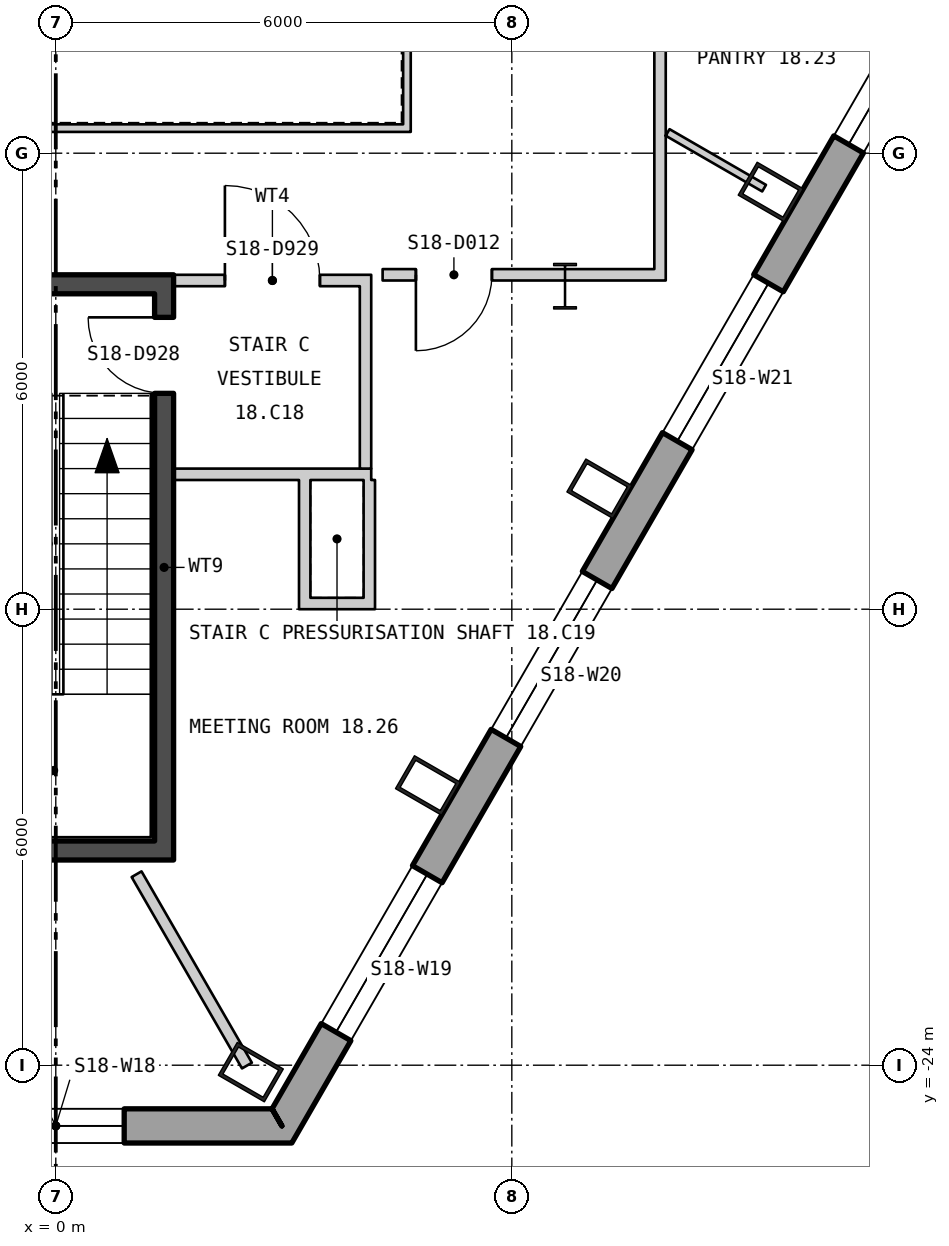
"""IFC4 building model, lengths in metres.
Left out: names, types, materials, properties, quantities, classifications, styles, units other than length and angle.
Written with IfcOpenShell. Run it as: python <this file> out.ifc"""

import sys

from ifc_helpers import new_model, si_unit, direction, frame, frame_2d, origin, origin_2d, place, context, subcontext, project, spatial, polyline, rectangle, hollow_rectangle, i_section, outline, extrude, element, fill, save


model = new_model("IFC4")
c1 = context("Model", 3, precision=1e-05, world=origin(), true_north=direction((0.0, 1.0)))
c2 = subcontext(c1, "Body", "Model", "MODEL_VIEW")
j1 = project(units=[si_unit("LENGTHUNIT", "METRE"), si_unit("PLANEANGLEUNIT", "RADIAN")], contexts=[c1])
p1 = place(None, origin())
s1 = spatial("IfcSite", under=j1, at=p1, CompositionType="ELEMENT")
p2 = place(p1, origin())
s2 = spatial("IfcBuilding", under=s1, at=p2, CompositionType="ELEMENT")
p3 = place(p2, frame((0.0, 0.0, 245.4)))
s3 = spatial("IfcBuildingStorey", under=s2, at=p3, CompositionType="ELEMENT", Elevation=245.4)
for number, where, z_axis, x_axis in (
    (1, (2.566, -24.091, 0.0), (0.0, 0.0, 1.0), (0.5, 0.866, 0.0)),
    (2, (4.897, -20.319, 0.0), (0.0, 0.0, 1.0), (0.5, 0.866, 0.0)),
    (3, (7.152, -16.415, 0.0), (0.0, 0.0, 1.0), (0.5, 0.866, 0.0)),
    (4, (9.406, -12.51, 0.0), (0.0, 0.0, 1.0), (0.5, 0.866, 0.0)),
):
    element("IfcColumn", number, at=place(p3, frame(where, z_axis=z_axis, x_axis=x_axis)), inside=s3, PredefinedType="COLUMN", context=c2, shape_type="SweptSolid", body=[
        extrude(hollow_rectangle(XDim=0.5, YDim=0.7, WallThickness=0.045, at=origin_2d()), origin(), (0.0, 0.0, 1.0), 3.9),
    ])
p4 = place(p3, frame((6.7, -13.75, 0.0), z_axis=(0.0, 0.0, 1.0), x_axis=(1.0, 0.0, 0.0)))
e5 = element("IfcColumn", 5, at=p4, inside=s3, PredefinedType="COLUMN", context=c2, shape_type="SweptSolid", body=[
    extrude(i_section(OverallWidth=0.3, OverallDepth=0.6, WebThickness=0.015, FlangeThickness=0.03, at=origin_2d()), origin(), (0.0, 0.0, 1.0), 3.9),
])
p5 = place(p3, frame((-2.975, -24.799, -0.18), z_axis=(0.0, 0.0, 1.0), x_axis=(1.0, 0.0, 0.0)))
e6 = element("IfcWall", 6, at=p5, inside=s3, PredefinedType="SOLIDWALL", context=c2, shape_type="SweptSolid", body=[
    extrude(outline(polyline([(-0.13, -0.225), (6.08, -0.225), (5.82, 0.225), (0.13, 0.225), (-0.13, -0.225)])), origin(), (0.0, 0.0, 1.0), 3.68),
])
p6 = place(p5, frame((2.075, 0.0, 1.08)))
e7 = element("IfcOpeningElement", 7, at=p6, cuts=e6, PredefinedType="OPENING", context=c2, shape_type="SweptSolid", body=[
    extrude(rectangle(XDim=1.8, YDim=2.0, at=frame_2d((0.9, 1.0))), frame((0.0, 0.235, 0.0), z_axis=(0.0, -1.0, 0.0), x_axis=(1.0, 0.0, 0.0)), (0.0, 0.0, 1.0), 0.47),
])
p7 = place(p3, frame((2.975, -24.799, -0.18), z_axis=(0.0, 0.0, 1.0), x_axis=(0.500000335318, 0.866025210188, 0.0)))
e8 = element("IfcWall", 8, at=p7, inside=s3, PredefinedType="SOLIDWALL", context=c2, shape_type="SweptSolid", body=[
    extrude(outline(polyline([(-0.13, -0.225), (45.88, -0.225), (45.62, 0.225), (0.13, 0.225), (-0.13, -0.225)])), origin(), (0.0, 0.0, 1.0), 3.68),
])
p8 = place(p7, frame((1.425, 0.0, 1.08)))
e9 = element("IfcOpeningElement", 9, at=p8, cuts=e8, PredefinedType="OPENING", context=c2, shape_type="SweptSolid", body=[
    extrude(rectangle(XDim=2.4, YDim=2.0, at=frame_2d((1.2, 1.0))), frame((0.0, 0.235, 0.0), z_axis=(0.0, -1.0, 0.0), x_axis=(1.0, 0.0, 0.0)), (0.0, 0.0, 1.0), 0.47),
])
p9 = place(p7, frame((5.895, 0.0, 1.08)))
e10 = element("IfcOpeningElement", 10, at=p9, cuts=e8, PredefinedType="OPENING", context=c2, shape_type="SweptSolid", body=[
    extrude(rectangle(XDim=2.4, YDim=2.0, at=frame_2d((1.2, 1.0))), frame((0.0, 0.235, 0.0), z_axis=(0.0, -1.0, 0.0), x_axis=(1.0, 0.0, 0.0)), (0.0, 0.0, 1.0), 0.47),
])
p10 = place(p7, frame((10.403, 0.0, 1.08)))
e11 = element("IfcOpeningElement", 11, at=p10, cuts=e8, PredefinedType="OPENING", context=c2, shape_type="SweptSolid", body=[
    extrude(rectangle(XDim=2.4, YDim=2.0, at=frame_2d((1.2, 1.0))), frame((0.0, 0.235, 0.0), z_axis=(0.0, -1.0, 0.0), x_axis=(1.0, 0.0, 0.0)), (0.0, 0.0, 1.0), 0.47),
])
p11 = place(p7, frame((14.912, 0.0, 1.08)))
e12 = element("IfcOpeningElement", 12, at=p11, cuts=e8, PredefinedType="OPENING", context=c2, shape_type="SweptSolid", body=[
    extrude(rectangle(XDim=2.4, YDim=2.0, at=frame_2d((1.2, 1.0))), frame((0.0, 0.235, 0.0), z_axis=(0.0, -1.0, 0.0), x_axis=(1.0, 0.0, 0.0)), (0.0, 0.0, 1.0), 0.47),
])
p12 = place(p7, frame((19.421, 0.0, 1.08)))
e13 = element("IfcOpeningElement", 13, at=p12, cuts=e8, PredefinedType="OPENING", context=c2, shape_type="SweptSolid", body=[
    extrude(rectangle(XDim=2.4, YDim=2.0, at=frame_2d((1.2, 1.0))), frame((0.0, 0.235, 0.0), z_axis=(0.0, -1.0, 0.0), x_axis=(1.0, 0.0, 0.0)), (0.0, 0.0, 1.0), 0.47),
])
p13 = place(p7, frame((23.929, 0.0, 1.08)))
e14 = element("IfcOpeningElement", 14, at=p13, cuts=e8, PredefinedType="OPENING", context=c2, shape_type="SweptSolid", body=[
    extrude(rectangle(XDim=2.4, YDim=2.0, at=frame_2d((1.2, 1.0))), frame((0.0, 0.235, 0.0), z_axis=(0.0, -1.0, 0.0), x_axis=(1.0, 0.0, 0.0)), (0.0, 0.0, 1.0), 0.47),
])
p14 = place(p7, frame((28.438, 0.0, 1.08)))
e15 = element("IfcOpeningElement", 15, at=p14, cuts=e8, PredefinedType="OPENING", context=c2, shape_type="SweptSolid", body=[
    extrude(rectangle(XDim=2.4, YDim=2.0, at=frame_2d((1.2, 1.0))), frame((0.0, 0.235, 0.0), z_axis=(0.0, -1.0, 0.0), x_axis=(1.0, 0.0, 0.0)), (0.0, 0.0, 1.0), 0.47),
])
p15 = place(p7, frame((32.947, 0.0, 1.08)))
e16 = element("IfcOpeningElement", 16, at=p15, cuts=e8, PredefinedType="OPENING", context=c2, shape_type="SweptSolid", body=[
    extrude(rectangle(XDim=2.4, YDim=2.0, at=frame_2d((1.2, 1.0))), frame((0.0, 0.235, 0.0), z_axis=(0.0, -1.0, 0.0), x_axis=(1.0, 0.0, 0.0)), (0.0, 0.0, 1.0), 0.47),
])
p16 = place(p7, frame((37.455, 0.0, 1.08)))
e17 = element("IfcOpeningElement", 17, at=p16, cuts=e8, PredefinedType="OPENING", context=c2, shape_type="SweptSolid", body=[
    extrude(rectangle(XDim=2.4, YDim=2.0, at=frame_2d((1.2, 1.0))), frame((0.0, 0.235, 0.0), z_axis=(0.0, -1.0, 0.0), x_axis=(1.0, 0.0, 0.0)), (0.0, 0.0, 1.0), 0.47),
])
p17 = place(p7, frame((41.925, 0.0, 1.08)))
e18 = element("IfcOpeningElement", 18, at=p17, cuts=e8, PredefinedType="OPENING", context=c2, shape_type="SweptSolid", body=[
    extrude(rectangle(XDim=2.4, YDim=2.0, at=frame_2d((1.2, 1.0))), frame((0.0, 0.235, 0.0), z_axis=(0.0, -1.0, 0.0), x_axis=(1.0, 0.0, 0.0)), (0.0, 0.0, 1.0), 0.47),
])
p18 = place(p3, frame((-4.67, -11.67, 0.0), z_axis=(0.0, 0.0, 1.0), x_axis=(1.0, 0.0, 0.0)))
e19 = element("IfcWall", 19, at=p18, inside=s3, PredefinedType="PARTITIONING", context=c2, shape_type="SweptSolid", body=[
    extrude(rectangle(XDim=9.34, YDim=0.1, at=frame_2d((4.67, 0.0))), origin(), (0.0, 0.0, 1.0), 3.7),
])
p19 = place(p3, frame((4.62, -11.62, 0.0), z_axis=(0.0, 0.0, 1.0), x_axis=(0.0, 1.0, 0.0)))
e20 = element("IfcWall", 20, at=p19, inside=s3, PredefinedType="PARTITIONING", context=c2, shape_type="SweptSolid", body=[
    extrude(rectangle(XDim=8.04, YDim=0.1, at=frame_2d((4.02, 0.0))), origin(), (0.0, 0.0, 1.0), 3.7),
])
p20 = place(p3, frame((1.425, -21.05, 0.0), z_axis=(0.0, 0.0, 1.0), x_axis=(0.0, 1.0, 0.0)))
e21 = element("IfcWall", 21, at=p20, inside=s3, PredefinedType="SHEAR", context=c2, shape_type="SweptSolid", body=[
    extrude(rectangle(XDim=7.2, YDim=0.25, at=frame_2d((3.6, 0.0))), origin(), (0.0, 0.0, 1.0), 3.7),
])
p21 = place(p20, frame((5.89, 0.0, 0.0)))
e22 = element("IfcOpeningElement", 22, at=p21, cuts=e21, PredefinedType="OPENING", context=c2, shape_type="SweptSolid", body=[
    extrude(rectangle(XDim=1.0, YDim=2.1, at=frame_2d((0.5, 1.05))), frame((0.0, 0.135, 0.0), z_axis=(0.0, -1.0, 0.0), x_axis=(1.0, 0.0, 0.0)), (0.0, 0.0, 1.0), 0.27),
])
for number, where, z_axis, x_axis in (
    (23, (-1.55, -21.175, 0.0), (0.0, 0.0, 1.0), (1.0, 0.0, 0.0)),
    (24, (-1.55, -13.725, 0.0), (0.0, 0.0, 1.0), (1.0, 0.0, 0.0)),
):
    element("IfcWall", number, at=place(p3, frame(where, z_axis=z_axis, x_axis=x_axis)), inside=s3, PredefinedType="SHEAR", context=c2, shape_type="SweptSolid", body=[
        extrude(rectangle(XDim=3.1, YDim=0.25, at=frame_2d((1.55, 0.0))), origin(), (0.0, 0.0, 1.0), 3.7),
    ])
p22 = place(p3, frame((1.55, -16.225, 0.0), z_axis=(0.0, 0.0, 1.0), x_axis=(1.0, 0.0, 0.0)))
e25 = element("IfcWall", 25, at=p22, inside=s3, PredefinedType="PARTITIONING", context=c2, shape_type="SweptSolid", body=[
    extrude(rectangle(XDim=2.6, YDim=0.15, at=frame_2d((1.3, 0.0))), origin(), (0.0, 0.0, 1.0), 3.7),
])
p23 = place(p3, frame((4.075, -16.15, 0.0), z_axis=(0.0, 0.0, 1.0), x_axis=(0.0, 1.0, 0.0)))
e26 = element("IfcWall", 26, at=p23, inside=s3, PredefinedType="PARTITIONING", context=c2, shape_type="SweptSolid", body=[
    extrude(rectangle(XDim=2.4, YDim=0.15, at=frame_2d((1.2, 0.0))), origin(), (0.0, 0.0, 1.0), 3.7),
])
p24 = place(p3, frame((1.55, -13.675, 0.0), z_axis=(0.0, 0.0, 1.0), x_axis=(1.0, 0.0, 0.0)))
e27 = element("IfcWall", 27, at=p24, inside=s3, PredefinedType="PARTITIONING", context=c2, shape_type="SweptSolid", body=[
    extrude(rectangle(XDim=2.6, YDim=0.15, at=frame_2d((1.3, 0.0))), origin(), (0.0, 0.0, 1.0), 2.91),
])
p25 = place(p24, frame((0.675, 0.0, 0.0)))
e28 = element("IfcOpeningElement", 28, at=p25, cuts=e27, PredefinedType="OPENING", context=c2, shape_type="SweptSolid", body=[
    extrude(rectangle(XDim=1.25, YDim=2.1, at=frame_2d((0.625, 1.05))), frame((0.0, 0.085, 0.0), z_axis=(0.0, -1.0, 0.0), x_axis=(1.0, 0.0, 0.0)), (0.0, 0.0, 1.0), 0.17),
])
p26 = place(p3, frame((3.275, -18.0, 0.0), z_axis=(0.0, 0.0, 1.0), x_axis=(0.0, 1.0, 0.0)))
e29 = element("IfcWall", 29, at=p26, inside=s3, PredefinedType="PARTITIONING", context=c2, shape_type="SweptSolid", body=[
    extrude(rectangle(XDim=1.7, YDim=0.15, at=frame_2d((0.85, 0.0))), origin(), (0.0, 0.0, 1.0), 3.01),
])
p27 = place(p3, frame((3.35, -17.925, 0.0), z_axis=(0.0, 0.0, 1.0), x_axis=(1.0, 0.0, 0.0)))
e30 = element("IfcWall", 30, at=p27, inside=s3, PredefinedType="PARTITIONING", context=c2, shape_type="SweptSolid", body=[
    extrude(rectangle(XDim=0.7, YDim=0.15, at=frame_2d((0.35, 0.0))), origin(), (0.0, 0.0, 1.0), 3.7),
])
p28 = place(p3, frame((4.125, -18.0, 0.0), z_axis=(0.0, 0.0, 1.0), x_axis=(0.0, 1.0, 0.0)))
e31 = element("IfcWall", 31, at=p28, inside=s3, PredefinedType="PARTITIONING", context=c2, shape_type="SweptSolid", body=[
    extrude(rectangle(XDim=1.7, YDim=0.15, at=frame_2d((0.85, 0.0))), origin(), (0.0, 0.0, 1.0), 3.7),
])
p29 = place(p3, frame((1.063, -21.487, 0.0), z_axis=(0.0, 0.0, 1.0), x_axis=(0.499543741449, -0.866288664579, 0.0)))
e32 = element("IfcWall", 32, at=p29, inside=s3, PredefinedType="PARTITIONING", context=c2, shape_type="SweptSolid", body=[
    extrude(rectangle(XDim=2.907, YDim=0.15, at=frame_2d((1.453, 0.0))), origin(), (0.0, 0.0, 1.0), 3.7),
])
p30 = place(p3, frame((4.3, -13.6, 0.0), z_axis=(0.0, 0.0, 1.0), x_axis=(1.0, 0.0, 0.0)))
e33 = element("IfcWall", 33, at=p30, inside=s3, PredefinedType="PARTITIONING", context=c2, shape_type="SweptSolid", body=[
    extrude(rectangle(XDim=2.4, YDim=0.15, at=frame_2d((1.2, 0.0))), origin(), (0.0, 0.0, 1.0), 2.91),
])
p31 = place(p30, frame((0.438, 0.0, 0.0)))
e34 = element("IfcOpeningElement", 34, at=p31, cuts=e33, PredefinedType="OPENING", context=c2, shape_type="SweptSolid", body=[
    extrude(rectangle(XDim=1.0, YDim=2.1, at=frame_2d((0.5, 1.05))), frame((0.0, 0.085, 0.0), z_axis=(0.0, -1.0, 0.0), x_axis=(1.0, 0.0, 0.0)), (0.0, 0.0, 1.0), 0.17),
])
p32 = place(p3, frame((6.7, -13.6, 0.0), z_axis=(0.0, 0.0, 1.0), x_axis=(1.0, 0.0, 0.0)))
e35 = element("IfcWall", 35, at=p32, inside=s3, PredefinedType="PARTITIONING", context=c2, shape_type="SweptSolid", body=[
    extrude(rectangle(XDim=1.175, YDim=0.15, at=frame_2d((0.588, 0.0))), origin(), (0.0, 0.0, 1.0), 3.16),
])
p33 = place(p3, frame((7.95, -13.675, 0.0), z_axis=(0.0, 0.0, 1.0), x_axis=(0.0, 1.0, 0.0)))
e36 = element("IfcWall", 36, at=p33, inside=s3, PredefinedType="PARTITIONING", context=c2, shape_type="SweptSolid", body=[
    extrude(rectangle(XDim=17.675, YDim=0.15, at=frame_2d((8.838, 0.0))), origin(), (0.0, 0.0, 1.0), 3.7),
])
p34 = place(p33, frame((4.109, 0.0, 0.0)))
e37 = element("IfcOpeningElement", 37, at=p34, cuts=e36, PredefinedType="OPENING", context=c2, shape_type="SweptSolid", body=[
    extrude(rectangle(XDim=1.0, YDim=2.1, at=frame_2d((0.5, 1.05))), frame((0.0, 0.085, 0.0), z_axis=(0.0, -1.0, 0.0), x_axis=(1.0, 0.0, 0.0)), (0.0, 0.0, 1.0), 0.17),
])
p35 = place(p33, frame((13.287, 0.0, 0.0)))
e38 = element("IfcOpeningElement", 38, at=p35, cuts=e36, PredefinedType="OPENING", context=c2, shape_type="SweptSolid", body=[
    extrude(rectangle(XDim=1.0, YDim=2.1, at=frame_2d((0.5, 1.05))), frame((0.0, 0.085, 0.0), z_axis=(0.0, -1.0, 0.0), x_axis=(1.0, 0.0, 0.0)), (0.0, 0.0, 1.0), 0.17),
])
p36 = place(p33, frame((16.275, 0.0, 0.0)))
e39 = element("IfcOpeningElement", 39, at=p36, cuts=e36, PredefinedType="OPENING", context=c2, shape_type="SweptSolid", body=[
    extrude(rectangle(XDim=1.0, YDim=2.1, at=frame_2d((0.5, 1.05))), frame((0.0, 0.085, 0.0), z_axis=(0.0, -1.0, 0.0), x_axis=(1.0, 0.0, 0.0)), (0.0, 0.0, 1.0), 0.17),
])
p37 = place(p3, frame((8.05, -11.727, 0.0), z_axis=(0.0, 0.0, 1.0), x_axis=(0.865924183809, -0.500175277173, 0.0)))
e40 = element("IfcWall", 40, at=p37, inside=s3, PredefinedType="PARTITIONING", context=c2, shape_type="SweptSolid", body=[
    extrude(rectangle(XDim=1.466, YDim=0.1, at=frame_2d((0.733, 0.0))), origin(), (0.0, 0.0, 1.0), 3.7),
])
p38 = place(p6, origin())
e41 = element("IfcWindow", 41, at=p38, inside=s3, PartitioningType="SINGLE_PANEL", PredefinedType="WINDOW", context=c2, shape_type="SweptSolid", body=[
    extrude(rectangle(XDim=1.8, YDim=2.0, at=frame_2d((0.9, 1.0))), frame((0.0, 0.105, 0.0), z_axis=(0.0, -1.0, 0.0), x_axis=(1.0, 0.0, 0.0)), (0.0, 0.0, 1.0), 0.06),
])
fill(e7, e41)
p39 = place(p8, origin())
e42 = element("IfcWindow", 42, at=p39, inside=s3, PartitioningType="SINGLE_PANEL", PredefinedType="WINDOW", context=c2, shape_type="SweptSolid", body=[
    extrude(rectangle(XDim=2.4, YDim=2.0, at=frame_2d((1.2, 1.0))), frame((0.0, 0.105, 0.0), z_axis=(0.0, -1.0, 0.0), x_axis=(1.0, 0.0, 0.0)), (0.0, 0.0, 1.0), 0.06),
])
fill(e9, e42)
p40 = place(p9, origin())
e43 = element("IfcWindow", 43, at=p40, inside=s3, PartitioningType="SINGLE_PANEL", PredefinedType="WINDOW", context=c2, shape_type="SweptSolid", body=[
    extrude(rectangle(XDim=2.4, YDim=2.0, at=frame_2d((1.2, 1.0))), frame((0.0, 0.105, 0.0), z_axis=(0.0, -1.0, 0.0), x_axis=(1.0, 0.0, 0.0)), (0.0, 0.0, 1.0), 0.06),
])
fill(e10, e43)
p41 = place(p10, origin())
e44 = element("IfcWindow", 44, at=p41, inside=s3, PartitioningType="SINGLE_PANEL", PredefinedType="WINDOW", context=c2, shape_type="SweptSolid", body=[
    extrude(rectangle(XDim=2.4, YDim=2.0, at=frame_2d((1.2, 1.0))), frame((0.0, 0.105, 0.0), z_axis=(0.0, -1.0, 0.0), x_axis=(1.0, 0.0, 0.0)), (0.0, 0.0, 1.0), 0.06),
])
fill(e11, e44)
p42 = place(p11, origin())
e45 = element("IfcWindow", 45, at=p42, inside=s3, PartitioningType="SINGLE_PANEL", PredefinedType="WINDOW", context=c2, shape_type="SweptSolid", body=[
    extrude(rectangle(XDim=2.4, YDim=2.0, at=frame_2d((1.2, 1.0))), frame((0.0, 0.105, 0.0), z_axis=(0.0, -1.0, 0.0), x_axis=(1.0, 0.0, 0.0)), (0.0, 0.0, 1.0), 0.06),
])
fill(e12, e45)
p43 = place(p21, origin())
e46 = element("IfcDoor", 46, at=p43, inside=s3, OperationType="SINGLE_SWING_LEFT", PredefinedType="DOOR", context=c2, shape_type="SweptSolid", body=[
    extrude(rectangle(XDim=1.0, YDim=2.1, at=frame_2d((0.5, 1.05))), frame((0.0, 0.025, 0.0), z_axis=(0.0, -1.0, 0.0), x_axis=(1.0, 0.0, 0.0)), (0.0, 0.0, 1.0), 0.05),
])
fill(e22, e46)
p44 = place(p25, origin())
e47 = element("IfcDoor", 47, at=p44, inside=s3, OperationType="SINGLE_SWING_RIGHT", PredefinedType="DOOR", context=c2, shape_type="SweptSolid", body=[
    extrude(rectangle(XDim=1.25, YDim=2.1, at=frame_2d((0.625, 1.05))), frame((0.0, 0.025, 0.0), z_axis=(0.0, -1.0, 0.0), x_axis=(1.0, 0.0, 0.0)), (0.0, 0.0, 1.0), 0.05),
])
fill(e28, e47)
p45 = place(p31, origin())
e48 = element("IfcDoor", 48, at=p45, inside=s3, OperationType="SINGLE_SWING_LEFT", PredefinedType="DOOR", context=c2, shape_type="SweptSolid", body=[
    extrude(rectangle(XDim=1.0, YDim=2.1, at=frame_2d((0.5, 1.05))), frame((0.0, 0.025, 0.0), z_axis=(0.0, -1.0, 0.0), x_axis=(1.0, 0.0, 0.0)), (0.0, 0.0, 1.0), 0.05),
])
fill(e34, e48)
save(model, sys.argv[1])
